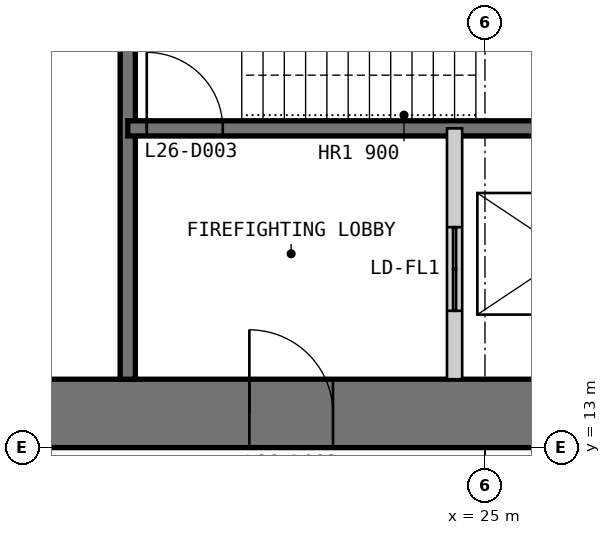
"""IFC4 building model, lengths in metres.
Left out: names, types, materials, properties, quantities, classifications, styles, units other than length and angle.
Written with IfcOpenShell. Run it as: python <this file> out.ifc"""

import sys

from ifc_helpers import new_model, si_unit, direction, frame, frame_2d, origin, place, context, subcontext, project, spatial, polyline, rectangle, outline, extrude, element, fill, save


model = new_model("IFC4")
c1 = context("Model", 3, precision=1e-05, world=origin(), true_north=direction((0.0, 1.0)))
c2 = subcontext(c1, "Body", "Model", "MODEL_VIEW")
j1 = project(units=[si_unit("LENGTHUNIT", "METRE"), si_unit("PLANEANGLEUNIT", "RADIAN")], contexts=[c1])
p1 = place(None, origin())
s1 = spatial("IfcSite", under=j1, at=p1, CompositionType="ELEMENT")
p2 = place(p1, origin())
s2 = spatial("IfcBuilding", under=s1, at=p2, CompositionType="ELEMENT")
p3 = place(p2, frame((0.0, 0.0, 114.4)))
s3 = spatial("IfcBuildingStorey", under=s2, at=p3, CompositionType="ELEMENT", Elevation=114.4)
p4 = place(p3, frame((13.0, 13.45, 0.0), z_axis=(0.0, 0.0, 1.0), x_axis=(1.0, 0.0, 0.0)))
e1 = element("IfcWall", 1, at=p4, inside=s3, PredefinedType="SHEAR", context=c2, shape_type="SweptSolid", body=[
    extrude(outline(polyline([(0.0, -0.45), (24.0, -0.45), (23.1, 0.45), (0.9, 0.45), (0.0, -0.45)])), origin(), (0.0, 0.0, 1.0), 4.0),
])
p5 = place(p4, frame((4.9, 0.0, 0.0)))
e2 = element("IfcOpeningElement", 2, at=p5, cuts=e1, PredefinedType="OPENING", context=c2, shape_type="SweptSolid", body=[
    extrude(rectangle(XDim=1.0, YDim=2.2, at=frame_2d((0.5, 1.1))), frame((0.0, 0.46, 0.0), z_axis=(0.0, -1.0, 0.0), x_axis=(1.0, 0.0, 0.0)), (0.0, 0.0, 1.0), 0.92),
])
p6 = place(p4, frame((8.9, 0.0, 0.0)))
e3 = element("IfcOpeningElement", 3, at=p6, cuts=e1, PredefinedType="OPENING", context=c2, shape_type="SweptSolid", body=[
    extrude(rectangle(XDim=1.1, YDim=2.2, at=frame_2d((0.55, 1.1))), frame((0.0, 0.46, 0.0), z_axis=(0.0, -1.0, 0.0), x_axis=(1.0, 0.0, 0.0)), (0.0, 0.0, 1.0), 0.92),
])
p7 = place(p4, frame((15.05, 0.0, 0.0)))
e4 = element("IfcOpeningElement", 4, at=p7, cuts=e1, PredefinedType="OPENING", context=c2, shape_type="SweptSolid", body=[
    extrude(rectangle(XDim=0.9, YDim=2.2, at=frame_2d((0.45, 1.1))), frame((0.0, 0.46, 0.0), z_axis=(0.0, -1.0, 0.0), x_axis=(1.0, 0.0, 0.0)), (0.0, 0.0, 1.0), 0.92),
])
p8 = place(p4, frame((17.9, 0.0, 0.0)))
e5 = element("IfcOpeningElement", 5, at=p8, cuts=e1, PredefinedType="OPENING", context=c2, shape_type="SweptSolid", body=[
    extrude(rectangle(XDim=1.0, YDim=2.2, at=frame_2d((0.5, 1.1))), frame((0.0, 0.46, 0.0), z_axis=(0.0, -1.0, 0.0), x_axis=(1.0, 0.0, 0.0)), (0.0, 0.0, 1.0), 0.92),
])
p9 = place(p4, frame((21.4, 0.0, 0.0)))
e6 = element("IfcOpeningElement", 6, at=p9, cuts=e1, PredefinedType="OPENING", context=c2, shape_type="SweptSolid", body=[
    extrude(rectangle(XDim=1.0, YDim=2.2, at=frame_2d((0.5, 1.1))), frame((0.0, 0.46, 0.0), z_axis=(0.0, -1.0, 0.0), x_axis=(1.0, 0.0, 0.0)), (0.0, 0.0, 1.0), 0.92),
])
p10 = place(p3, frame((20.3, 13.9, 0.0), z_axis=(0.0, 0.0, 1.0), x_axis=(0.0, 1.0, 0.0)))
e7 = element("IfcWall", 7, at=p10, inside=s3, PredefinedType="SOLIDWALL", context=c2, shape_type="SweptSolid", body=[
    extrude(rectangle(XDim=16.1, YDim=0.2, at=frame_2d((8.05, 0.0))), origin(), (0.0, 0.0, 1.0), 3.8),
])
p11 = place(p10, frame((7.217, 0.0, 0.0)))
e8 = element("IfcOpeningElement", 8, at=p11, cuts=e7, PredefinedType="OPENING", context=c2, shape_type="SweptSolid", body=[
    extrude(rectangle(XDim=1.1, YDim=2.2, at=frame_2d((0.55, 1.1))), frame((0.0, 0.11, 0.0), z_axis=(0.0, -1.0, 0.0), x_axis=(1.0, 0.0, 0.0)), (0.0, 0.0, 1.0), 0.22),
])
p12 = place(p10, frame((10.55, 0.0, 0.0)))
e9 = element("IfcOpeningElement", 9, at=p12, cuts=e7, PredefinedType="OPENING", context=c2, shape_type="SweptSolid", body=[
    extrude(rectangle(XDim=1.1, YDim=2.2, at=frame_2d((0.55, 1.1))), frame((0.0, 0.11, 0.0), z_axis=(0.0, -1.0, 0.0), x_axis=(1.0, 0.0, 0.0)), (0.0, 0.0, 1.0), 0.22),
])
p13 = place(p10, frame((13.883, 0.0, 0.0)))
e10 = element("IfcOpeningElement", 10, at=p13, cuts=e7, PredefinedType="OPENING", context=c2, shape_type="SweptSolid", body=[
    extrude(rectangle(XDim=1.1, YDim=2.2, at=frame_2d((0.55, 1.1))), frame((0.0, 0.11, 0.0), z_axis=(0.0, -1.0, 0.0), x_axis=(1.0, 0.0, 0.0)), (0.0, 0.0, 1.0), 0.22),
])
p14 = place(p3, frame((20.3, 17.2, 0.0), z_axis=(0.0, 0.0, 1.0), x_axis=(1.0, 0.0, 0.0)))
e11 = element("IfcWall", 11, at=p14, inside=s3, PredefinedType="SOLIDWALL", context=c2, shape_type="SweptSolid", body=[
    extrude(rectangle(XDim=9.4, YDim=0.2, at=frame_2d((4.7, 0.0))), origin(), (0.0, 0.0, 1.0), 3.8),
])
p15 = place(p14, frame((0.25, 0.0, 0.0)))
e12 = element("IfcOpeningElement", 12, at=p15, cuts=e11, PredefinedType="OPENING", context=c2, shape_type="SweptSolid", body=[
    extrude(rectangle(XDim=1.0, YDim=2.2, at=frame_2d((0.5, 1.1))), frame((0.0, 0.11, 0.0), z_axis=(0.0, -1.0, 0.0), x_axis=(1.0, 0.0, 0.0)), (0.0, 0.0, 1.0), 0.22),
])
p16 = place(p3, frame((24.6, 13.9, 0.0), z_axis=(0.0, 0.0, 1.0), x_axis=(0.0, 1.0, 0.0)))
e13 = element("IfcWall", 13, at=p16, inside=s3, PredefinedType="PARTITIONING", context=c2, shape_type="SweptSolid", body=[
    extrude(rectangle(XDim=3.3, YDim=0.2, at=frame_2d((1.65, 0.0))), origin(), (0.0, 0.0, 1.0), 3.8),
])
p17 = place(p16, frame((0.9, 0.0, 0.0)))
e14 = element("IfcOpeningElement", 14, at=p17, cuts=e13, PredefinedType="OPENING", context=c2, shape_type="SweptSolid", body=[
    extrude(rectangle(XDim=1.1, YDim=2.2, at=frame_2d((0.55, 1.1))), frame((0.0, 0.11, 0.0), z_axis=(0.0, -1.0, 0.0), x_axis=(1.0, 0.0, 0.0)), (0.0, 0.0, 1.0), 0.22),
])
p18 = place(p6, origin())
e15 = element("IfcDoor", 15, at=p18, inside=s3, OperationType="SINGLE_SWING_LEFT", PredefinedType="DOOR", context=c2, shape_type="SweptSolid", body=[
    extrude(rectangle(XDim=1.1, YDim=2.2, at=frame_2d((0.55, 1.1))), frame((0.0, 0.025, 0.0), z_axis=(0.0, -1.0, 0.0), x_axis=(1.0, 0.0, 0.0)), (0.0, 0.0, 1.0), 0.05),
    extrude(outline(polyline([(0.0, 0.0), (0.04, 0.0), (0.04, 2.16), (1.06, 2.16), (1.06, 0.0), (1.1, 0.0), (1.1, 2.2), (0.0, 2.2), (0.0, 0.0)])), frame((0.0, 0.3, 0.0), z_axis=(0.0, -1.0, 0.0), x_axis=(1.0, 0.0, 0.0)), (0.0, 0.0, 1.0), 0.6),
])
fill(e3, e15)
p19 = place(p15, origin())
e16 = element("IfcDoor", 16, at=p19, inside=s3, OperationType="SINGLE_SWING_LEFT", PredefinedType="DOOR", context=c2, shape_type="SweptSolid", body=[
    extrude(rectangle(XDim=1.0, YDim=2.2, at=frame_2d((0.5, 1.1))), frame((0.0, 0.025, 0.0), z_axis=(0.0, -1.0, 0.0), x_axis=(1.0, 0.0, 0.0)), (0.0, 0.0, 1.0), 0.05),
])
fill(e12, e16)
p20 = place(p17, origin())
e17 = element("IfcDoor", 17, at=p20, inside=s3, OperationType="DOUBLE_DOOR_SLIDING", PredefinedType="DOOR", context=c2, shape_type="SweptSolid", body=[
    extrude(rectangle(XDim=1.1, YDim=2.2, at=frame_2d((0.55, 1.1))), frame((0.0, 0.025, 0.0), z_axis=(0.0, -1.0, 0.0), x_axis=(1.0, 0.0, 0.0)), (0.0, 0.0, 1.0), 0.05),
])
fill(e14, e17)
save(model, sys.argv[1])
